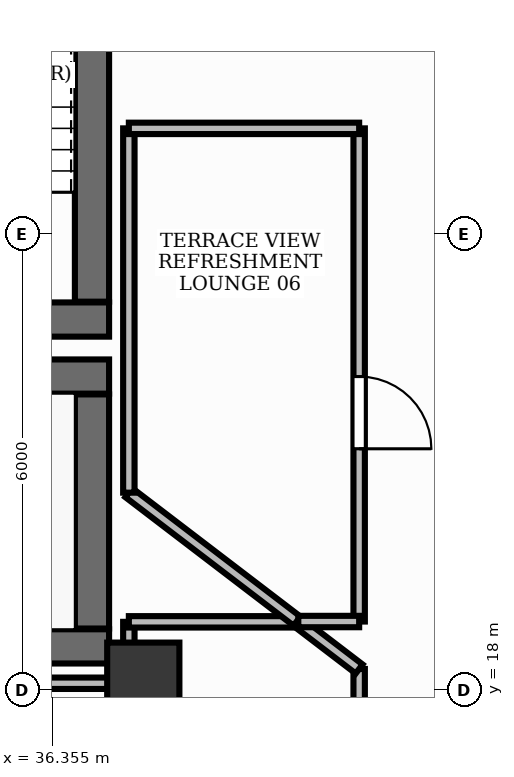
"""IFC4 building model, lengths in metres.
Left out: names, types, materials, properties, quantities, classifications, styles, units other than length and angle.
Written with IfcOpenShell. Run it as: python <this file> out.ifc"""

import sys

from ifc_helpers import new_model, si_unit, direction, frame, frame_2d, origin, origin_2d, place, context, subcontext, project, spatial, rectangle, extrude, element, fill, save


model = new_model("IFC4")
c1 = context("Model", 3, precision=1e-05, world=origin(), true_north=direction((0.0, 1.0)))
c2 = subcontext(c1, "Body", "Model", "MODEL_VIEW")
j1 = project(units=[si_unit("LENGTHUNIT", "METRE"), si_unit("PLANEANGLEUNIT", "RADIAN")], contexts=[c1])
p1 = place(None, origin())
s1 = spatial("IfcSite", under=j1, at=p1, CompositionType="ELEMENT")
p2 = place(p1, origin())
s2 = spatial("IfcBuilding", under=s1, at=p2, CompositionType="ELEMENT")
p3 = place(p2, frame((0.0, 0.0, 30.0)))
s3 = spatial("IfcBuildingStorey", under=s2, at=p3, CompositionType="ELEMENT", Elevation=30.0)
p4 = place(p3, frame((28.852, 18.575, 0.0), z_axis=(0.0, 0.0, 1.0), x_axis=(1.0, 0.0, 0.0)))
e1 = element("IfcWall", 1, at=p4, inside=s3, PredefinedType="SHEAR", context=c2, shape_type="SweptSolid", body=[
    extrude(rectangle(XDim=8.248, YDim=0.45, at=frame_2d((4.124, 0.0))), origin(), (0.0, 0.0, 1.0), 3.9),
])
p5 = place(p3, frame((28.35, 22.125, 0.0), z_axis=(0.0, 0.0, 1.0), x_axis=(1.0, 0.0, 0.0)))
e2 = element("IfcWall", 2, at=p5, inside=s3, PredefinedType="SHEAR", context=c2, shape_type="SweptSolid", body=[
    extrude(rectangle(XDim=8.75, YDim=0.45, at=frame_2d((4.375, 0.0))), origin(), (0.0, 0.0, 1.0), 3.9),
])
p6 = place(p3, frame((36.875, 18.81, 0.0), z_axis=(0.0, 0.0, 1.0), x_axis=(0.0, 1.0, 0.0)))
e3 = element("IfcWall", 3, at=p6, inside=s3, PredefinedType="SHEAR", context=c2, shape_type="SweptSolid", body=[
    extrude(rectangle(XDim=3.08, YDim=0.45, at=frame_2d((1.54, 0.0))), origin(), (0.0, 0.0, 1.0), 3.9),
])
p7 = place(p3, frame((33.1, 22.875, 0.0), z_axis=(0.0, 0.0, 1.0), x_axis=(1.0, 0.0, 0.0)))
e4 = element("IfcWall", 4, at=p7, inside=s3, PredefinedType="SHEAR", context=c2, shape_type="SweptSolid", body=[
    extrude(rectangle(XDim=4.0, YDim=0.45, at=frame_2d((2.0, 0.0))), origin(), (0.0, 0.0, 1.0), 3.9),
])
p8 = place(p3, frame((36.875, 23.11, 0.0), z_axis=(0.0, 0.0, 1.0), x_axis=(0.0, 1.0, 0.0)))
e5 = element("IfcWall", 5, at=p8, inside=s3, PredefinedType="SHEAR", context=c2, shape_type="SweptSolid", body=[
    extrude(rectangle(XDim=7.78, YDim=0.45, at=frame_2d((3.89, 0.0))), origin(), (0.0, 0.0, 1.0), 3.9),
])
p9 = place(p3, frame((37.55, 18.15, -0.0), z_axis=(0.0, 0.0, 1.0), x_axis=(1.0, 0.0, 0.0)))
e6 = element("IfcColumn", 6, at=p9, inside=s3, PredefinedType="PILASTER", context=c2, shape_type="SweptSolid", body=[
    extrude(rectangle(XDim=0.95, YDim=0.95, at=origin_2d()), origin(), (0.0, 0.0, 1.0), 3.901),
])
p10 = place(p3, frame((40.39, 18.278, 0.0), z_axis=(0.0, 0.0, 1.0), x_axis=(0.0, -1.0, 0.0)))
e7 = element("IfcWall", 7, at=p10, inside=s3, PredefinedType="PARTITIONING", context=c2, shape_type="SweptSolid", body=[
    extrude(rectangle(XDim=1.778, YDim=0.15, at=frame_2d((0.889, 0.0))), origin(), (0.0, 0.0, 1.0), 2.91),
])
p11 = place(p10, frame((0.588, 0.0, 0.0)))
e8 = element("IfcOpeningElement", 8, at=p11, cuts=e7, PredefinedType="OPENING", context=c2, shape_type="SweptSolid", body=[
    extrude(rectangle(XDim=0.95, YDim=2.15, at=frame_2d((0.475, 1.075))), frame((0.0, 0.09, 0.0), z_axis=(0.0, -1.0, 0.0), x_axis=(1.0, 0.0, 0.0)), (0.0, 0.0, 1.0), 0.18),
])
p12 = place(p3, frame((40.39, 25.39, 0.0), z_axis=(0.0, 0.0, 1.0), x_axis=(0.0, -1.0, 0.0)))
e9 = element("IfcWall", 9, at=p12, inside=s3, PredefinedType="PARTITIONING", context=c2, shape_type="SweptSolid", body=[
    extrude(rectangle(XDim=6.488, YDim=0.15, at=frame_2d((3.244, 0.0))), origin(), (0.0, 0.0, 1.0), 2.91),
])
p13 = place(p12, frame((3.265, 0.0, 0.0)))
e10 = element("IfcOpeningElement", 10, at=p13, cuts=e9, PredefinedType="OPENING", context=c2, shape_type="SweptSolid", body=[
    extrude(rectangle(XDim=0.95, YDim=2.15, at=frame_2d((0.475, 1.075))), frame((0.0, 0.09, 0.0), z_axis=(0.0, -1.0, 0.0), x_axis=(1.0, 0.0, 0.0)), (0.0, 0.0, 1.0), 0.18),
])
p14 = place(p3, frame((29.0, 18.09, 0.0), z_axis=(0.0, 0.0, 1.0), x_axis=(1.0, 0.0, 0.0)))
e11 = element("IfcWall", 11, at=p14, inside=s3, PredefinedType="PARTITIONING", context=c2, shape_type="SweptSolid", body=[
    extrude(rectangle(XDim=8.35, YDim=0.15, at=frame_2d((4.175, 0.0))), origin(), (0.0, 0.0, 1.0), 2.91),
])
p15 = place(p3, frame((37.36, 18.1, 0.0), z_axis=(0.0, 0.0, 1.0), x_axis=(0.0, 1.0, 0.0)))
e12 = element("IfcWall", 12, at=p15, inside=s3, PredefinedType="PARTITIONING", context=c2, shape_type="SweptSolid", body=[
    extrude(rectangle(XDim=0.798, YDim=0.15, at=frame_2d((0.399, 0.0))), origin(), (0.0, 0.0, 1.0), 2.91),
])
p16 = place(p3, frame((37.36, 18.898, 0.0), z_axis=(0.0, 0.0, 1.0), x_axis=(1.0, 0.0, 0.0)))
e13 = element("IfcWall", 13, at=p16, inside=s3, PredefinedType="PARTITIONING", context=c2, shape_type="SweptSolid", body=[
    extrude(rectangle(XDim=2.218, YDim=0.15, at=frame_2d((1.109, 0.0))), origin(), (0.0, 0.0, 1.0), 2.91),
])
p17 = place(p3, frame((39.578, 18.898, 0.0), z_axis=(0.0, 0.0, 1.0), x_axis=(0.794690228638, -0.607015189684, 0.0)))
e14 = element("IfcWall", 14, at=p17, inside=s3, PredefinedType="PARTITIONING", context=c2, shape_type="SweptSolid", body=[
    extrude(rectangle(XDim=1.021, YDim=0.15, at=frame_2d((0.511, 0.0))), origin(), (0.0, 0.0, 1.0), 2.91),
])
p18 = place(p3, frame((39.572, 18.908, 0.0), z_axis=(0.0, 0.0, 1.0), x_axis=(-0.794673946055, 0.607036505872, 0.0)))
e15 = element("IfcWall", 15, at=p18, inside=s3, PredefinedType="PARTITIONING", context=c2, shape_type="SweptSolid", body=[
    extrude(rectangle(XDim=2.783, YDim=0.15, at=frame_2d((1.392, 0.0))), origin(), (0.0, 0.0, 1.0), 2.91),
])
p19 = place(p3, frame((37.36, 20.597, 0.0), z_axis=(0.0, 0.0, 1.0), x_axis=(0.0, 1.0, 0.0)))
e16 = element("IfcWall", 16, at=p19, inside=s3, PredefinedType="PARTITIONING", context=c2, shape_type="SweptSolid", body=[
    extrude(rectangle(XDim=4.792, YDim=0.15, at=frame_2d((2.396, 0.0))), origin(), (0.0, 0.0, 1.0), 2.91),
])
p20 = place(p3, frame((37.36, 25.39, 0.0), z_axis=(0.0, 0.0, 1.0), x_axis=(1.0, 0.0, 0.0)))
e17 = element("IfcWall", 17, at=p20, inside=s3, PredefinedType="PARTITIONING", context=c2, shape_type="SweptSolid", body=[
    extrude(rectangle(XDim=3.03, YDim=0.15, at=frame_2d((1.515, 0.0))), origin(), (0.0, 0.0, 1.0), 2.91),
])
p21 = place(p3, frame((40.39, 18.902, 0.0), z_axis=(0.0, 0.0, 1.0), x_axis=(-1.0, 0.0, 0.0)))
e18 = element("IfcWall", 18, at=p21, inside=s3, PredefinedType="PARTITIONING", context=c2, shape_type="SweptSolid", body=[
    extrude(rectangle(XDim=0.8, YDim=0.15, at=frame_2d((0.4, 0.0))), origin(), (0.0, 0.0, 1.0), 2.91),
])
p22 = place(p13, origin())
e19 = element("IfcDoor", 19, at=p22, inside=s3, OperationType="SINGLE_SWING_RIGHT", PredefinedType="DOOR", context=c2, shape_type="SweptSolid", body=[
    extrude(rectangle(XDim=0.95, YDim=2.15, at=frame_2d((0.475, 1.075))), frame((0.0, 0.025, 0.0), z_axis=(0.0, -1.0, 0.0), x_axis=(1.0, 0.0, 0.0)), (0.0, 0.0, 1.0), 0.05),
])
fill(e10, e19)
save(model, sys.argv[1])
